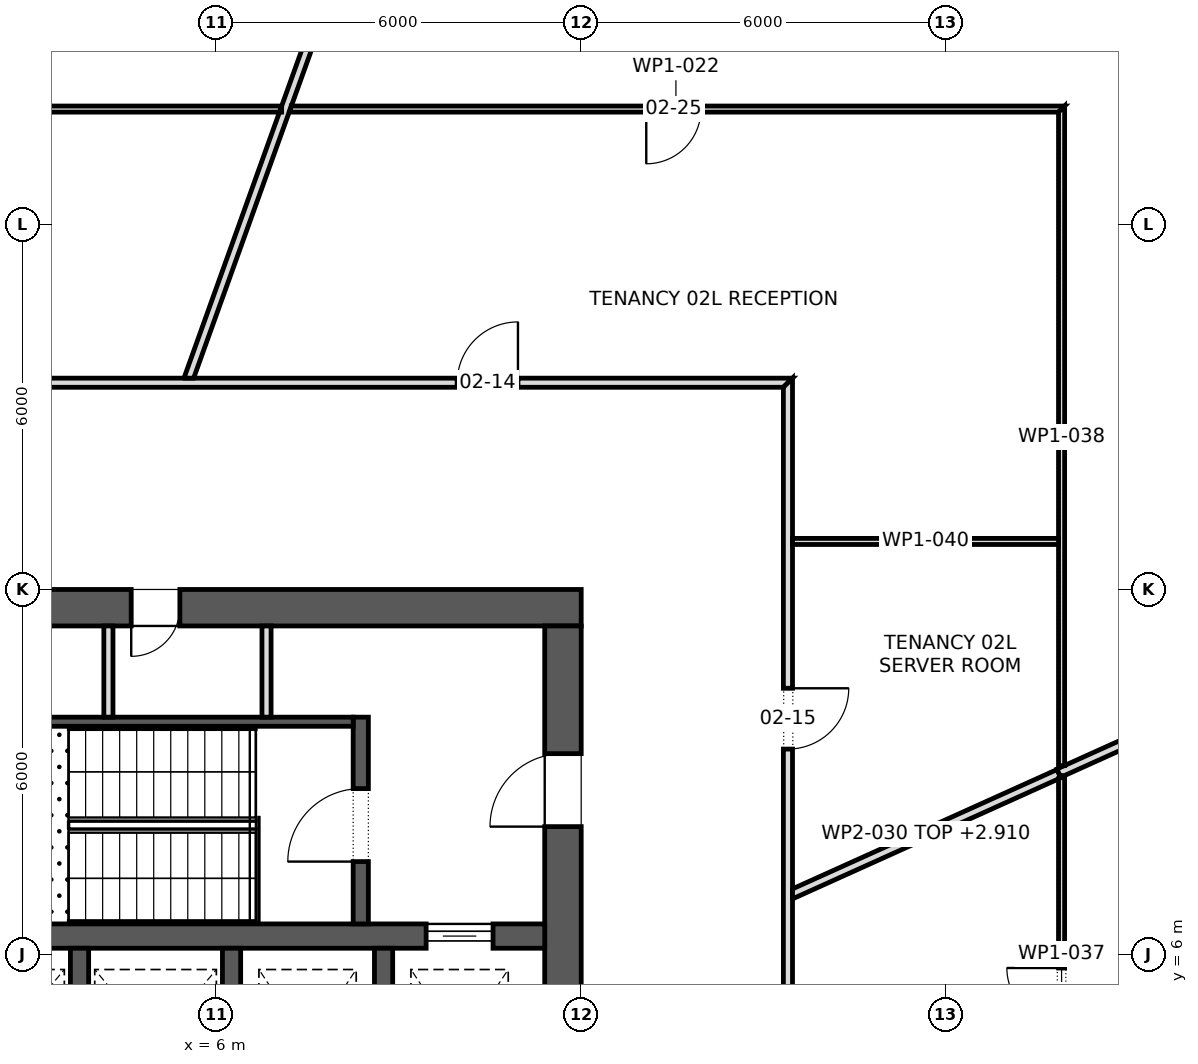
"""IFC4 building model, lengths in metres.
Left out: names, types, materials, properties, quantities, classifications, styles, units other than length and angle.
Written with IfcOpenShell. Run it as: python <this file> out.ifc"""

import sys

from ifc_helpers import new_model, si_unit, direction, frame, frame_2d, origin, place, context, subcontext, project, spatial, polyline, rectangle, outline, extrude, element, fill, save


model = new_model("IFC4")
c1 = context("Model", 3, precision=1e-05, world=origin(), true_north=direction((0.0, 1.0)))
c2 = subcontext(c1, "Body", "Model", "MODEL_VIEW")
j1 = project(units=[si_unit("LENGTHUNIT", "METRE"), si_unit("PLANEANGLEUNIT", "RADIAN")], contexts=[c1])
p1 = place(None, origin())
s1 = spatial("IfcSite", under=j1, at=p1, CompositionType="ELEMENT")
p2 = place(p1, origin())
s2 = spatial("IfcBuilding", under=s1, at=p2, CompositionType="ELEMENT")
p3 = place(p2, frame((0.0, 0.0, 44.5)))
s3 = spatial("IfcBuildingStorey", under=s2, at=p3, CompositionType="ELEMENT", Elevation=44.5)
p4 = place(p3, frame((-12.0, 11.7, 0.0), z_axis=(0.0, 0.0, 1.0), x_axis=(1.0, 0.0, 0.0)))
e1 = element("IfcWall", 1, at=p4, inside=s3, PredefinedType="SHEAR", context=c2, shape_type="SweptSolid", body=[
    extrude(rectangle(XDim=24.0, YDim=0.6, at=frame_2d((12.0, 0.0))), origin(), (0.0, 0.0, 1.0), 4.2),
])
p5 = place(p4, frame((9.225, 0.0, 0.0)))
e2 = element("IfcOpeningElement", 2, at=p5, cuts=e1, PredefinedType="OPENING", context=c2, shape_type="SweptSolid", body=[
    extrude(rectangle(XDim=0.9, YDim=2.1, at=frame_2d((0.45, 1.05))), frame((0.0, 0.312, 0.0), z_axis=(0.0, -1.0, 0.0), x_axis=(1.0, 0.0, 0.0)), (0.0, 0.0, 1.0), 0.624),
])
p6 = place(p4, frame((10.925, 0.0, 0.0)))
e3 = element("IfcOpeningElement", 3, at=p6, cuts=e1, PredefinedType="OPENING", context=c2, shape_type="SweptSolid", body=[
    extrude(rectangle(XDim=0.8, YDim=2.1, at=frame_2d((0.4, 1.05))), frame((0.0, 0.312, 0.0), z_axis=(0.0, -1.0, 0.0), x_axis=(1.0, 0.0, 0.0)), (0.0, 0.0, 1.0), 0.624),
])
p7 = place(p4, frame((4.2, 0.0, 0.0)))
e4 = element("IfcOpeningElement", 4, at=p7, cuts=e1, PredefinedType="OPENING", context=c2, shape_type="SweptSolid", body=[
    extrude(rectangle(XDim=0.8, YDim=2.1, at=frame_2d((0.4, 1.05))), frame((0.0, 0.312, 0.0), z_axis=(0.0, -1.0, 0.0), x_axis=(1.0, 0.0, 0.0)), (0.0, 0.0, 1.0), 0.624),
])
p8 = place(p4, frame((13.8, 0.0, 0.0)))
e5 = element("IfcOpeningElement", 5, at=p8, cuts=e1, PredefinedType="OPENING", context=c2, shape_type="SweptSolid", body=[
    extrude(rectangle(XDim=0.8, YDim=2.1, at=frame_2d((0.4, 1.05))), frame((0.0, 0.312, 0.0), z_axis=(0.0, -1.0, 0.0), x_axis=(1.0, 0.0, 0.0)), (0.0, 0.0, 1.0), 0.624),
])
p9 = place(p4, frame((16.6, 0.0, 0.0)))
e6 = element("IfcOpeningElement", 6, at=p9, cuts=e1, PredefinedType="OPENING", context=c2, shape_type="SweptSolid", body=[
    extrude(rectangle(XDim=0.8, YDim=2.1, at=frame_2d((0.4, 1.05))), frame((0.0, 0.312, 0.0), z_axis=(0.0, -1.0, 0.0), x_axis=(1.0, 0.0, 0.0)), (0.0, 0.0, 1.0), 0.624),
])
p10 = place(p3, frame((11.7, -11.4, 0.0), z_axis=(0.0, 0.0, 1.0), x_axis=(0.0, 1.0, 0.0)))
e7 = element("IfcWall", 7, at=p10, inside=s3, PredefinedType="SHEAR", context=c2, shape_type="SweptSolid", body=[
    extrude(rectangle(XDim=22.8, YDim=0.6, at=frame_2d((11.4, 0.0))), origin(), (0.0, 0.0, 1.0), 4.2),
])
p11 = place(p10, frame((10.2, 0.0, 0.0)))
e8 = element("IfcOpeningElement", 8, at=p11, cuts=e7, PredefinedType="OPENING", context=c2, shape_type="SweptSolid", body=[
    extrude(rectangle(XDim=2.4, YDim=2.1, at=frame_2d((1.2, 1.05))), frame((0.0, 0.312, 0.0), z_axis=(0.0, -1.0, 0.0), x_axis=(1.0, 0.0, 0.0)), (0.0, 0.0, 1.0), 0.624),
])
p12 = place(p10, frame((19.5, 0.0, 0.0)))
e9 = element("IfcOpeningElement", 9, at=p12, cuts=e7, PredefinedType="OPENING", context=c2, shape_type="SweptSolid", body=[
    extrude(rectangle(XDim=1.2, YDim=2.1, at=frame_2d((0.6, 1.05))), frame((0.0, 0.312, 0.0), z_axis=(0.0, -1.0, 0.0), x_axis=(1.0, 0.0, 0.0)), (0.0, 0.0, 1.0), 0.624),
])
p13 = place(p10, frame((2.1, 0.0, 0.0)))
e10 = element("IfcOpeningElement", 10, at=p13, cuts=e7, PredefinedType="OPENING", context=c2, shape_type="SweptSolid", body=[
    extrude(rectangle(XDim=1.2, YDim=2.1, at=frame_2d((0.6, 1.05))), frame((0.0, 0.312, 0.0), z_axis=(0.0, -1.0, 0.0), x_axis=(1.0, 0.0, 0.0)), (0.0, 0.0, 1.0), 0.624),
])
p14 = place(p3, frame((-11.4, 6.3, 0.0), z_axis=(0.0, 0.0, 1.0), x_axis=(1.0, 0.0, 0.0)))
e11 = element("IfcWall", 11, at=p14, inside=s3, PredefinedType="SHEAR", context=c2, shape_type="SweptSolid", body=[
    extrude(rectangle(XDim=22.8, YDim=0.4, at=frame_2d((11.4, 0.0))), origin(), (0.0, 0.0, 1.0), 4.2),
])
p15 = place(p14, frame((20.85, 0.0, 0.0)))
e12 = element("IfcOpeningElement", 12, at=p15, cuts=e11, PredefinedType="OPENING", context=c2, shape_type="SweptSolid", body=[
    extrude(rectangle(XDim=1.1, YDim=2.1, at=frame_2d((0.55, 1.05))), frame((0.0, 0.212, 0.0), z_axis=(0.0, -1.0, 0.0), x_axis=(1.0, 0.0, 0.0)), (0.0, 0.0, 1.0), 0.424),
])
for number, where, z_axis, x_axis in (
    (13, (3.75, 3.2, 0.0), (0.0, 0.0, 1.0), (0.0, 1.0, 0.0)),
    (14, (6.25, 3.2, 0.0), (0.0, 0.0, 1.0), (0.0, 1.0, 0.0)),
    (15, (8.75, 3.2, 0.0), (0.0, 0.0, 1.0), (0.0, 1.0, 0.0)),
):
    element("IfcWall", number, at=place(p3, frame(where, z_axis=z_axis, x_axis=x_axis)), inside=s3, PredefinedType="SHEAR", context=c2, shape_type="SweptSolid", body=[
        extrude(rectangle(XDim=2.9, YDim=0.3, at=frame_2d((1.45, 0.0))), origin(), (0.0, 0.0, 1.0), 4.2),
    ])
p16 = place(p3, frame((8.375, 6.5, 0.0), z_axis=(0.0, 0.0, 1.0), x_axis=(0.0, 1.0, 0.0)))
e16 = element("IfcWall", 16, at=p16, inside=s3, PredefinedType="SHEAR", context=c2, shape_type="SweptSolid", body=[
    extrude(rectangle(XDim=3.4, YDim=0.25, at=frame_2d((1.7, 0.0))), origin(), (0.0, 0.0, 1.0), 3.9),
])
p17 = place(p16, frame((1.025, 0.0, 0.0)))
e17 = element("IfcOpeningElement", 17, at=p17, cuts=e16, PredefinedType="OPENING", context=c2, shape_type="SweptSolid", body=[
    extrude(rectangle(XDim=1.2, YDim=2.1, at=frame_2d((0.6, 1.05))), frame((0.0, 0.137, 0.0), z_axis=(0.0, -1.0, 0.0), x_axis=(1.0, 0.0, 0.0)), (0.0, 0.0, 1.0), 0.274),
])
p18 = place(p3, frame((0.25, 9.825, 0.0), z_axis=(0.0, 0.0, 1.0), x_axis=(1.0, 0.0, 0.0)))
e18 = element("IfcWall", 18, at=p18, inside=s3, PredefinedType="SHEAR", context=c2, shape_type="SweptSolid", body=[
    extrude(rectangle(XDim=8.0, YDim=0.15, at=frame_2d((4.0, 0.0))), origin(), (0.0, 0.0, 1.0), 3.9),
])
for number, where, z_axis, x_axis in (
    (19, (4.225, 9.9, 0.0), (0.0, 0.0, 1.0), (0.0, 1.0, 0.0)),
    (20, (6.825, 9.9, 0.0), (0.0, 0.0, 1.0), (0.0, 1.0, 0.0)),
):
    element("IfcWall", number, at=place(p3, frame(where, z_axis=z_axis, x_axis=x_axis)), inside=s3, PredefinedType="PARTITIONING", context=c2, shape_type="SweptSolid", body=[
        extrude(rectangle(XDim=1.5, YDim=0.15, at=frame_2d((0.75, 0.0))), origin(), (0.0, 0.0, 1.0), 3.9),
    ])
p19 = place(p3, frame((-15.475, 15.4, 0.0), z_axis=(0.0, 0.0, 1.0), x_axis=(1.0, 0.0, 0.0)))
e21 = element("IfcWall", 21, at=p19, inside=s3, PredefinedType="PARTITIONING", context=c2, shape_type="SweptSolid", body=[
    extrude(outline(polyline([(0.15, -0.075), (2.066, -0.075), (3.981, -0.075), (5.897, -0.075), (7.812, -0.075), (9.728, -0.075), (11.644, -0.075), (13.56, -0.075), (15.475, -0.075), (17.391, -0.075), (19.306, -0.075), (21.222, -0.075), (23.138, -0.075), (25.053, -0.075), (26.969, -0.075), (28.885, -0.075), (30.8, -0.075), (30.95, 0.075), (29.016, 0.075), (27.081, 0.075), (25.147, 0.075), (23.212, 0.075), (21.278, 0.075), (19.344, 0.075), (17.409, 0.075), (15.475, 0.075), (13.541, 0.075), (11.606, 0.075), (9.672, 0.075), (7.738, 0.075), (5.803, 0.075), (3.869, 0.075), (1.935, 0.075), (0.0, 0.075), (0.15, -0.075)])), origin(), (0.0, 0.0, 1.0), 3.9),
])
p20 = place(p19, frame((5.415, 0.0, 0.0)))
e22 = element("IfcOpeningElement", 22, at=p20, cuts=e21, PredefinedType="OPENING", context=c2, shape_type="SweptSolid", body=[
    extrude(rectangle(XDim=1.0, YDim=2.1, at=frame_2d((0.5, 1.05))), frame((0.0, 0.087, 0.0), z_axis=(0.0, -1.0, 0.0), x_axis=(1.0, 0.0, 0.0)), (0.0, 0.0, 1.0), 0.174),
])
p21 = place(p19, frame((25.435, 0.0, 0.0)))
e23 = element("IfcOpeningElement", 23, at=p21, cuts=e21, PredefinedType="OPENING", context=c2, shape_type="SweptSolid", body=[
    extrude(rectangle(XDim=1.0, YDim=2.1, at=frame_2d((0.5, 1.05))), frame((0.0, 0.087, 0.0), z_axis=(0.0, -1.0, 0.0), x_axis=(1.0, 0.0, 0.0)), (0.0, 0.0, 1.0), 0.174),
])
p22 = place(p19, frame((14.975, 0.0, 0.0)))
e24 = element("IfcOpeningElement", 24, at=p22, cuts=e21, PredefinedType="OPENING", context=c2, shape_type="SweptSolid", body=[
    extrude(rectangle(XDim=1.0, YDim=2.1, at=frame_2d((0.5, 1.05))), frame((0.0, 0.087, 0.0), z_axis=(0.0, -1.0, 0.0), x_axis=(1.0, 0.0, 0.0)), (0.0, 0.0, 1.0), 0.174),
])
p23 = place(p3, frame((-7.074, 19.9, 0.0), z_axis=(0.0, 0.0, 1.0), x_axis=(1.0, 0.0, 0.0)))
e25 = element("IfcWall", 25, at=p23, inside=s3, PredefinedType="PARTITIONING", context=c2, shape_type="SweptSolid", body=[
    extrude(outline(polyline([(0.036, -0.05), (1.795, -0.05), (3.555, -0.05), (5.314, -0.05), (7.074, -0.05), (8.833, -0.05), (10.593, -0.05), (12.353, -0.05), (14.112, -0.05), (14.148, 0.05), (14.148, 0.05), (12.379, 0.05), (10.611, 0.05), (8.843, 0.05), (7.074, 0.05), (5.305, 0.05), (3.537, 0.05), (1.769, 0.05), (0.0, 0.05), (0.0, 0.05), (0.036, -0.05)])), origin(), (0.0, 0.0, 1.0), 3.9),
])
p24 = place(p23, frame((6.624, 0.0, 0.0)))
e26 = element("IfcOpeningElement", 26, at=p24, cuts=e25, PredefinedType="OPENING", context=c2, shape_type="SweptSolid", body=[
    extrude(rectangle(XDim=0.9, YDim=2.1, at=frame_2d((0.45, 1.05))), frame((0.0, 0.062, 0.0), z_axis=(0.0, -1.0, 0.0), x_axis=(1.0, 0.0, 0.0)), (0.0, 0.0, 1.0), 0.124),
])
p25 = place(p3, frame((5.538, 15.45, 0.0), z_axis=(0.0, 0.0, 1.0), x_axis=(0.337949016046, 0.941164418448, 0.0)))
e27 = element("IfcWall", 27, at=p25, inside=s3, PredefinedType="PARTITIONING", context=c2, shape_type="SweptSolid", body=[
    extrude(outline(polyline([(0.053, -0.075), (1.638, -0.075), (3.222, -0.075), (4.806, -0.075), (4.808, -0.074), (4.808, -0.075), (6.558, -0.075), (8.308, -0.075), (10.057, -0.075), (11.807, -0.075), (13.557, -0.075), (13.557, -0.068), (13.556, 0.0), (13.543, 0.075), (11.785, 0.075), (10.028, 0.075), (8.27, 0.075), (6.512, 0.075), (4.754, 0.075), (4.66, 0.041), (4.648, 0.075), (3.099, 0.075), (1.549, 0.075), (0.0, 0.075), (0.0, 0.074), (0.053, -0.075)])), origin(), (0.0, 0.0, 1.0), 2.91),
])
p26 = place(p3, frame((7.198, 19.9, 0.0), z_axis=(0.0, 0.0, 1.0), x_axis=(1.0, 0.0, 0.0)))
e28 = element("IfcWall", 28, at=p26, inside=s3, PredefinedType="PARTITIONING", context=c2, shape_type="SweptSolid", body=[
    extrude(outline(polyline([(0.0, -0.05), (1.807, -0.05), (3.615, -0.05), (5.422, -0.05), (7.23, -0.05), (9.037, -0.05), (10.844, -0.05), (12.652, -0.05), (12.652, -0.05), (12.752, 0.05), (10.935, 0.05), (9.119, 0.05), (7.302, 0.05), (5.485, 0.05), (3.669, 0.05), (1.852, 0.05), (0.035, 0.05), (0.0, -0.049), (0.0, -0.05)])), origin(), (0.0, 0.0, 1.0), 3.9),
])
p27 = place(p26, frame((5.872, 0.0, 0.0)))
e29 = element("IfcOpeningElement", 29, at=p27, cuts=e28, PredefinedType="OPENING", context=c2, shape_type="SweptSolid", body=[
    extrude(rectangle(XDim=0.9, YDim=2.1, at=frame_2d((0.45, 1.05))), frame((0.0, 0.062, 0.0), z_axis=(0.0, -1.0, 0.0), x_axis=(1.0, 0.0, 0.0)), (0.0, 0.0, 1.0), 0.124),
])
p28 = place(p3, frame((15.4, -6.96, 0.0), z_axis=(0.0, 0.0, 1.0), x_axis=(0.0, 1.0, 0.0)))
e30 = element("IfcWall", 30, at=p28, inside=s3, PredefinedType="PARTITIONING", context=c2, shape_type="SweptSolid", body=[
    extrude(outline(polyline([(0.0, -0.075), (1.87, -0.075), (3.739, -0.075), (5.609, -0.075), (7.478, -0.075), (9.348, -0.075), (11.217, -0.075), (13.087, -0.075), (14.957, -0.075), (16.826, -0.075), (18.696, -0.075), (20.565, -0.075), (22.435, -0.075), (22.285, 0.075), (20.428, 0.075), (18.571, 0.075), (16.714, 0.075), (14.857, 0.075), (13.0, 0.075), (11.143, 0.075), (9.285, 0.075), (7.428, 0.075), (5.571, 0.075), (3.714, 0.075), (1.857, 0.075), (0.0, 0.075), (0.0, -0.075)])), origin(), (0.0, 0.0, 1.0), 3.9),
])
p29 = place(p28, frame((3.62, 0.0, 0.0)))
e31 = element("IfcOpeningElement", 31, at=p29, cuts=e30, PredefinedType="OPENING", context=c2, shape_type="SweptSolid", body=[
    extrude(rectangle(XDim=1.0, YDim=2.1, at=frame_2d((0.5, 1.05))), frame((0.0, 0.087, 0.0), z_axis=(0.0, -1.0, 0.0), x_axis=(1.0, 0.0, 0.0)), (0.0, 0.0, 1.0), 0.174),
])
p30 = place(p28, frame((10.58, 0.0, 0.0)))
e32 = element("IfcOpeningElement", 32, at=p30, cuts=e30, PredefinedType="OPENING", context=c2, shape_type="SweptSolid", body=[
    extrude(rectangle(XDim=1.0, YDim=2.1, at=frame_2d((0.5, 1.05))), frame((0.0, 0.087, 0.0), z_axis=(0.0, -1.0, 0.0), x_axis=(1.0, 0.0, 0.0)), (0.0, 0.0, 1.0), 0.174),
])
p31 = place(p28, frame((16.335, 0.0, 0.0)))
e33 = element("IfcOpeningElement", 33, at=p31, cuts=e30, PredefinedType="OPENING", context=c2, shape_type="SweptSolid", body=[
    extrude(rectangle(XDim=1.0, YDim=2.1, at=frame_2d((0.5, 1.05))), frame((0.0, 0.087, 0.0), z_axis=(0.0, -1.0, 0.0), x_axis=(1.0, 0.0, 0.0)), (0.0, 0.0, 1.0), 0.174),
])
p32 = place(p3, frame((15.444, 6.98, 0.0), z_axis=(0.0, 0.0, 1.0), x_axis=(0.911543776443, 0.411203044285, 0.0)))
e34 = element("IfcWall", 34, at=p32, inside=s3, PredefinedType="PARTITIONING", context=c2, shape_type="SweptSolid", body=[
    extrude(outline(polyline([(0.0, -0.075), (1.6, -0.075), (3.2, -0.075), (4.8, -0.075), (4.8, -0.074), (4.802, -0.075), (4.842, -0.075), (4.842, 0.075), (3.251, 0.075), (1.659, 0.075), (0.068, 0.075), (0.0, -0.075)])), origin(), (0.0, 0.0, 1.0), 2.91),
])
p33 = place(p3, frame((19.9, 8.94, 0.0), z_axis=(0.0, 0.0, 1.0), x_axis=(0.0, -1.0, 0.0)))
e35 = element("IfcWall", 35, at=p33, inside=s3, PredefinedType="PARTITIONING", context=c2, shape_type="SweptSolid", body=[
    extrude(outline(polyline([(7.208, -0.05), (7.208, -0.046), (7.201, 0.05), (5.4, 0.05), (3.6, 0.05), (1.8, 0.05), (0.0, 0.05), (0.0, 0.049), (0.029, -0.015), (0.0, -0.028), (0.0, -0.028), (0.037, -0.011), (0.055, -0.05), (1.843, -0.05), (3.632, -0.05), (5.42, -0.05), (7.208, -0.05)])), origin(), (0.0, 0.0, 1.0), 3.9),
])
p34 = place(p33, frame((3.165, 0.0, 0.0)))
e36 = element("IfcOpeningElement", 36, at=p34, cuts=e35, PredefinedType="OPENING", context=c2, shape_type="SweptSolid", body=[
    extrude(rectangle(XDim=0.9, YDim=2.1, at=frame_2d((0.45, 1.05))), frame((0.0, 0.062, 0.0), z_axis=(0.0, -1.0, 0.0), x_axis=(1.0, 0.0, 0.0)), (0.0, 0.0, 1.0), 0.124),
])
p35 = place(p3, frame((19.9, 9.103, 0.0), z_axis=(0.0, 0.0, 1.0), x_axis=(0.0, 1.0, 0.0)))
e37 = element("IfcWall", 37, at=p35, inside=s3, PredefinedType="PARTITIONING", context=c2, shape_type="SweptSolid", body=[
    extrude(outline(polyline([(0.0, -0.05), (1.808, -0.05), (3.616, -0.05), (5.424, -0.05), (7.232, -0.05), (9.04, -0.05), (10.847, -0.05), (10.747, 0.05), (8.956, 0.05), (7.165, 0.05), (5.374, 0.05), (3.583, 0.05), (1.791, 0.05), (0.0, 0.05), (0.0, -0.05)])), origin(), (0.0, 0.0, 1.0), 3.9),
])
p36 = place(p3, frame((19.854, 8.979, 0.0), z_axis=(0.0, 0.0, 1.0), x_axis=(0.911433390516, 0.411447657245, 0.0)))
e38 = element("IfcWall", 38, at=p36, inside=s3, PredefinedType="PARTITIONING", context=c2, shape_type="SweptSolid", body=[
    extrude(outline(polyline([(11.948, -0.075), (11.948, -0.063), (11.946, 0.001), (11.927, 0.075), (9.963, 0.075), (7.998, 0.075), (6.033, 0.075), (4.068, 0.075), (2.104, 0.075), (0.139, 0.075), (0.138, 0.073), (0.133, 0.075), (0.0, 0.075), (0.0, -0.043), (0.07, -0.075), (2.05, -0.075), (4.029, -0.075), (6.009, -0.075), (7.989, -0.075), (9.968, -0.075), (11.948, -0.075)])), origin(), (0.0, 0.0, 1.0), 2.91),
])
p37 = place(p3, frame((19.85, 12.79, 0.0), z_axis=(0.0, 0.0, 1.0), x_axis=(-1.0, 0.0, 0.0)))
e39 = element("IfcWall", 39, at=p37, inside=s3, PredefinedType="PARTITIONING", context=c2, shape_type="SweptSolid", body=[
    extrude(rectangle(XDim=4.375, YDim=0.1, at=frame_2d((2.188, 0.0))), origin(), (0.0, 0.0, 1.0), 3.9),
])
p38 = place(p15, origin())
e40 = element("IfcDoor", 40, at=p38, inside=s3, OperationType="SLIDING_TO_LEFT", PredefinedType="DOOR", context=c2, shape_type="SweptSolid", body=[
    extrude(rectangle(XDim=1.1, YDim=2.1, at=frame_2d((0.55, 1.05))), frame((0.0, 0.025, 0.0), z_axis=(0.0, -1.0, 0.0), x_axis=(1.0, 0.0, 0.0)), (0.0, 0.0, 1.0), 0.05),
])
fill(e12, e40)
p39 = place(p17, origin())
e41 = element("IfcDoor", 41, at=p39, inside=s3, OperationType="SINGLE_SWING_RIGHT", PredefinedType="DOOR", context=c2, shape_type="SweptSolid", body=[
    extrude(rectangle(XDim=1.2, YDim=2.1, at=frame_2d((0.6, 1.05))), frame((0.0, 0.025, 0.0), z_axis=(0.0, -1.0, 0.0), x_axis=(1.0, 0.0, 0.0)), (0.0, 0.0, 1.0), 0.05),
])
fill(e17, e41)
p40 = place(p12, origin())
e42 = element("IfcDoor", 42, at=p40, inside=s3, OperationType="SINGLE_SWING_RIGHT", PredefinedType="DOOR", context=c2, shape_type="SweptSolid", body=[
    extrude(rectangle(XDim=1.2, YDim=2.1, at=frame_2d((0.6, 1.05))), frame((0.0, 0.025, 0.0), z_axis=(0.0, -1.0, 0.0), x_axis=(1.0, 0.0, 0.0)), (0.0, 0.0, 1.0), 0.05),
])
fill(e9, e42)
p41 = place(p9, frame((0.8, 0.0, 0.0), z_axis=(0.0, 0.0, 1.0), x_axis=(-1.0, 0.0, 0.0)))
e43 = element("IfcDoor", 43, at=p41, inside=s3, OperationType="SINGLE_SWING_LEFT", PredefinedType="DOOR", context=c2, shape_type="SweptSolid", body=[
    extrude(rectangle(XDim=0.8, YDim=2.1, at=frame_2d((0.4, 1.05))), frame((0.0, 0.025, 0.0), z_axis=(0.0, -1.0, 0.0), x_axis=(1.0, 0.0, 0.0)), (0.0, 0.0, 1.0), 0.05),
])
fill(e6, e43)
p42 = place(p21, origin())
e44 = element("IfcDoor", 44, at=p42, inside=s3, OperationType="SINGLE_SWING_LEFT", PredefinedType="DOOR", context=c2, shape_type="SweptSolid", body=[
    extrude(rectangle(XDim=1.0, YDim=2.1, at=frame_2d((0.5, 1.05))), frame((0.0, 0.025, 0.0), z_axis=(0.0, -1.0, 0.0), x_axis=(1.0, 0.0, 0.0)), (0.0, 0.0, 1.0), 0.05),
])
fill(e23, e44)
p43 = place(p31, frame((1.0, 0.0, 0.0), z_axis=(0.0, 0.0, 1.0), x_axis=(-1.0, 0.0, 0.0)))
e45 = element("IfcDoor", 45, at=p43, inside=s3, OperationType="SINGLE_SWING_RIGHT", PredefinedType="DOOR", context=c2, shape_type="SweptSolid", body=[
    extrude(rectangle(XDim=1.0, YDim=2.1, at=frame_2d((0.5, 1.05))), frame((0.0, 0.025, 0.0), z_axis=(0.0, -1.0, 0.0), x_axis=(1.0, 0.0, 0.0)), (0.0, 0.0, 1.0), 0.05),
])
fill(e33, e45)
p44 = place(p34, frame((0.9, 0.0, 0.0), z_axis=(0.0, 0.0, 1.0), x_axis=(-1.0, 0.0, 0.0)))
e46 = element("IfcDoor", 46, at=p44, inside=s3, OperationType="SINGLE_SWING_LEFT", PredefinedType="DOOR", context=c2, shape_type="SweptSolid", body=[
    extrude(rectangle(XDim=0.9, YDim=2.1, at=frame_2d((0.45, 1.05))), frame((0.0, 0.025, 0.0), z_axis=(0.0, -1.0, 0.0), x_axis=(1.0, 0.0, 0.0)), (0.0, 0.0, 1.0), 0.05),
])
fill(e36, e46)
p45 = place(p27, frame((0.9, 0.0, 0.0), z_axis=(0.0, 0.0, 1.0), x_axis=(-1.0, 0.0, 0.0)))
e47 = element("IfcDoor", 47, at=p45, inside=s3, OperationType="SINGLE_SWING_LEFT", PredefinedType="DOOR", context=c2, shape_type="SweptSolid", body=[
    extrude(rectangle(XDim=0.9, YDim=2.1, at=frame_2d((0.45, 1.05))), frame((0.0, 0.025, 0.0), z_axis=(0.0, -1.0, 0.0), x_axis=(1.0, 0.0, 0.0)), (0.0, 0.0, 1.0), 0.05),
])
fill(e29, e47)
save(model, sys.argv[1])
